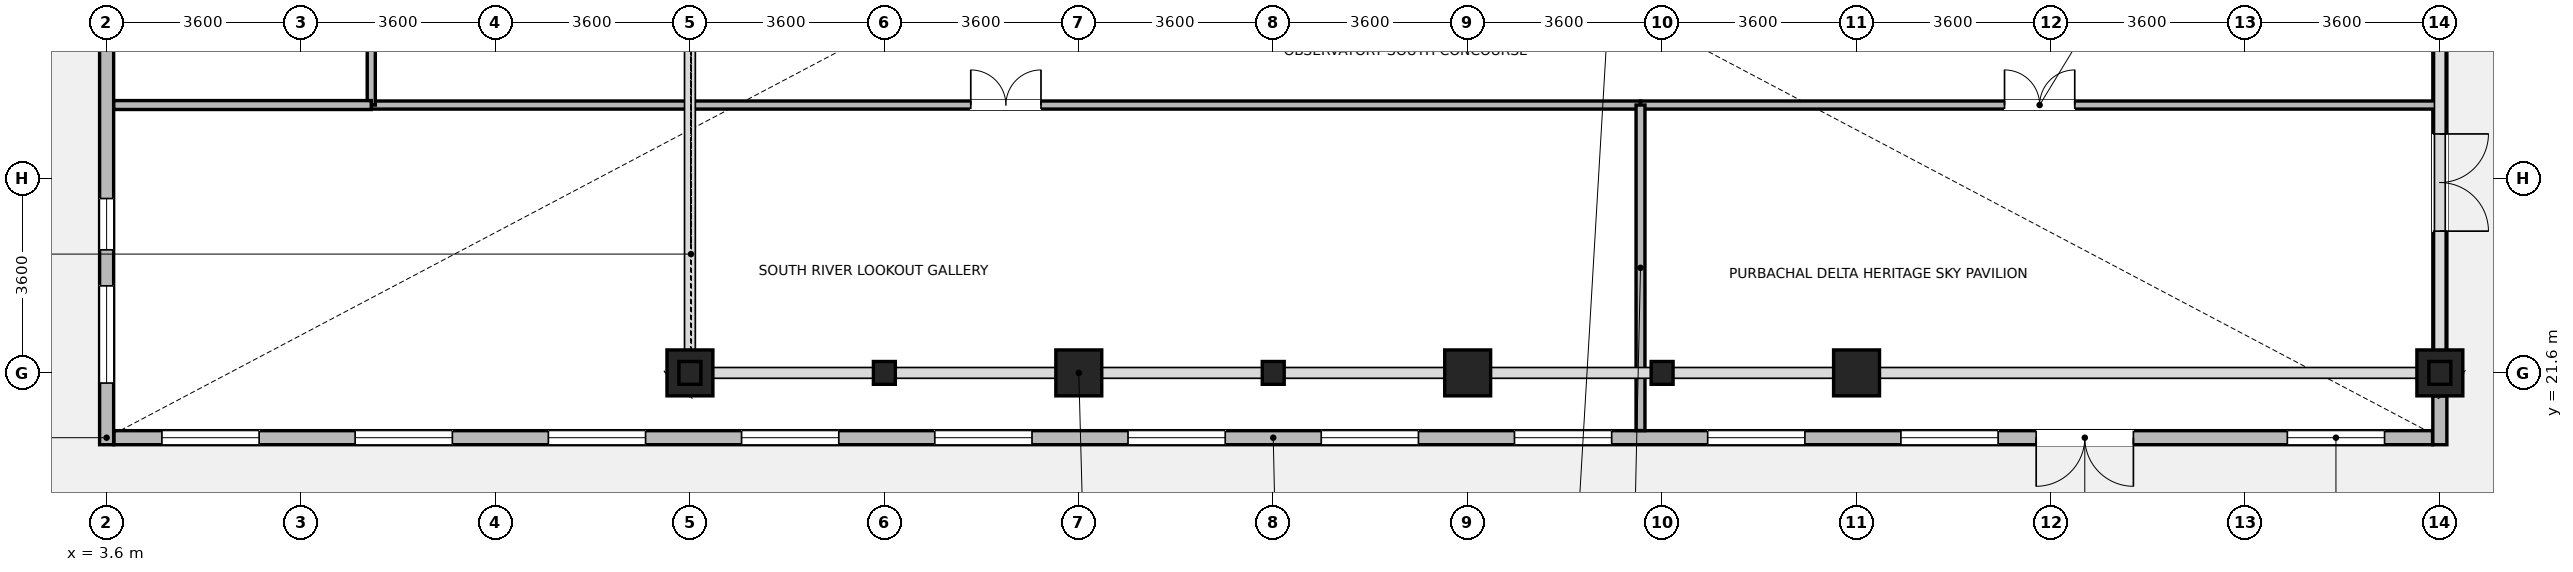
"""IFC4 building model, lengths in metres.
Left out: names, types, materials, properties, quantities, classifications, styles, units other than length and angle.
Written with IfcOpenShell. Run it as: python <this file> out.ifc"""

import sys

from ifc_helpers import new_model, si_unit, direction, frame, frame_2d, origin, origin_2d, place, context, subcontext, project, spatial, rectangle, i_section, extrude, source, transform, mapped, element, fill, save


model = new_model("IFC4")
c1 = context("Model", 3, precision=1e-05, world=origin(), true_north=direction((0.0, 1.0)))
c2 = subcontext(c1, "Body", "Model", "MODEL_VIEW")
j1 = project(units=[si_unit("LENGTHUNIT", "METRE"), si_unit("PLANEANGLEUNIT", "RADIAN")], contexts=[c1])
p1 = place(None, origin())
s1 = spatial("IfcSite", under=j1, at=p1, CompositionType="ELEMENT")
p2 = place(p1, origin())
s2 = spatial("IfcBuilding", under=s1, at=p2, CompositionType="ELEMENT")
p3 = place(p2, frame((0.0, 0.0, 298.0)))
s3 = spatial("IfcBuildingStorey", under=s2, at=p3, CompositionType="ELEMENT", Elevation=298.0)
m1 = source(origin(), c2, "Body", "SweptSolid", [
    extrude(rectangle(XDim=0.85, YDim=0.85, at=origin_2d()), origin(), (0.0, 0.0, 1.0), 6.0),
])
for number, where, z_axis, x_axis in (
    (1, (14.4, 21.6, 0.0), (0.0, 0.0, 1.0), (1.0, 0.0, 0.0)),
    (2, (21.6, 21.6, 0.0), (0.0, 0.0, 1.0), (1.0, 0.0, 0.0)),
    (3, (28.8, 21.6, 0.0), (0.0, 0.0, 1.0), (1.0, 0.0, 0.0)),
    (4, (36.0, 21.6, 0.0), (0.0, 0.0, 1.0), (1.0, 0.0, 0.0)),
    (5, (46.8, 21.6, 0.0), (0.0, 0.0, 1.0), (1.0, 0.0, 0.0)),
):
    element("IfcColumn", number, at=place(p3, frame(where, z_axis=z_axis, x_axis=x_axis)), inside=s3, PredefinedType="COLUMN", context=c2, shape_type="MappedRepresentation", body=[
        mapped(m1, transform((0.0, 0.0, 0.0), x_axis=(1.0, 0.0, 0.0), y_axis=(0.0, 1.0, 0.0), z_axis=(0.0, 0.0, 1.0), scale=1.0)),
    ])
m2 = source(origin(), c2, "Body", "SweptSolid", [
    extrude(i_section(OverallWidth=0.406, OverallDepth=0.422, WebThickness=0.023, FlangeThickness=0.031, FilletRadius=0.015, at=origin_2d()), origin(), (0.0, 0.0, 1.0), 6.0),
])
for number, where, z_axis, x_axis in (
    (6, (18.0, 21.6, 0.0), (0.0, 0.0, 1.0), (1.0, 0.0, 0.0)),
    (7, (25.2, 21.6, 0.0), (0.0, 0.0, 1.0), (1.0, 0.0, 0.0)),
    (8, (32.4, 21.6, 0.0), (0.0, 0.0, 1.0), (1.0, 0.0, 0.0)),
):
    element("IfcColumn", number, at=place(p3, frame(where, z_axis=z_axis, x_axis=x_axis)), inside=s3, PredefinedType="COLUMN", context=c2, shape_type="MappedRepresentation", body=[
        mapped(m2, transform((0.0, 0.0, 0.0), x_axis=(1.0, 0.0, 0.0), y_axis=(0.0, 1.0, 0.0), z_axis=(0.0, 0.0, 1.0), scale=1.0)),
    ])
m3 = source(origin(), c2, "Body", "SweptSolid", [
    extrude(i_section(OverallWidth=0.406, OverallDepth=0.422, WebThickness=0.023, FlangeThickness=0.031, FilletRadius=0.015, at=origin_2d()), origin(), (0.0, 0.0, 1.0), 15.0),
])
for number, where, z_axis, x_axis in (
    (9, (14.4, 21.6, 6.0), (0.0, 0.0, 1.0), (1.0, 0.0, 0.0)),
    (10, (46.8, 21.6, 6.0), (0.0, 0.0, 1.0), (1.0, 0.0, 0.0)),
):
    element("IfcColumn", number, at=place(p3, frame(where, z_axis=z_axis, x_axis=x_axis)), inside=s3, PredefinedType="COLUMN", context=c2, shape_type="MappedRepresentation", body=[
        mapped(m3, transform((0.0, 0.0, 0.0), x_axis=(1.0, 0.0, 0.0), y_axis=(0.0, 1.0, 0.0), z_axis=(0.0, 0.0, 1.0), scale=1.0)),
    ])
p4 = place(p3, frame((46.665, 20.4, 0.0), z_axis=(0.0, 0.0, 1.0), x_axis=(-1.0, 0.0, 0.0)))
e11 = element("IfcWall", 11, at=p4, inside=s3, PredefinedType="STANDARD", context=c2, shape_type="SweptSolid", body=[
    extrude(rectangle(XDim=42.93, YDim=0.26, at=frame_2d((21.465, 0.0))), origin(), (0.0, 0.0, 1.0), 5.9),
])
p5 = place(p4, frame((5.539, 0.0, 0.0)))
e12 = element("IfcOpeningElement", 12, at=p5, cuts=e11, PredefinedType="OPENING", context=c2, shape_type="SweptSolid", body=[
    extrude(rectangle(XDim=1.8, YDim=2.2, at=frame_2d((0.9, 1.1))), frame((0.0, 0.14, 0.0), z_axis=(0.0, -1.0, 0.0), x_axis=(1.0, 0.0, 0.0)), (0.0, 0.0, 1.0), 0.28),
])
p6 = place(p4, frame((0.889, 0.0, 0.85)))
e13 = element("IfcOpeningElement", 13, at=p6, cuts=e11, PredefinedType="OPENING", context=c2, shape_type="SweptSolid", body=[
    extrude(rectangle(XDim=1.8, YDim=1.85, at=frame_2d((0.9, 0.925))), frame((0.0, 0.14, 0.0), z_axis=(0.0, -1.0, 0.0), x_axis=(1.0, 0.0, 0.0)), (0.0, 0.0, 1.0), 0.28),
])
p7 = place(p4, frame((8.044, 0.0, 0.85)))
e14 = element("IfcOpeningElement", 14, at=p7, cuts=e11, PredefinedType="OPENING", context=c2, shape_type="SweptSolid", body=[
    extrude(rectangle(XDim=1.8, YDim=1.85, at=frame_2d((0.9, 0.925))), frame((0.0, 0.14, 0.0), z_axis=(0.0, -1.0, 0.0), x_axis=(1.0, 0.0, 0.0)), (0.0, 0.0, 1.0), 0.28),
])
p8 = place(p4, frame((11.621, 0.0, 0.85)))
e15 = element("IfcOpeningElement", 15, at=p8, cuts=e11, PredefinedType="OPENING", context=c2, shape_type="SweptSolid", body=[
    extrude(rectangle(XDim=1.8, YDim=1.85, at=frame_2d((0.9, 0.925))), frame((0.0, 0.14, 0.0), z_axis=(0.0, -1.0, 0.0), x_axis=(1.0, 0.0, 0.0)), (0.0, 0.0, 1.0), 0.28),
])
p9 = place(p4, frame((15.199, 0.0, 0.85)))
e16 = element("IfcOpeningElement", 16, at=p9, cuts=e11, PredefinedType="OPENING", context=c2, shape_type="SweptSolid", body=[
    extrude(rectangle(XDim=1.8, YDim=1.85, at=frame_2d((0.9, 0.925))), frame((0.0, 0.14, 0.0), z_axis=(0.0, -1.0, 0.0), x_axis=(1.0, 0.0, 0.0)), (0.0, 0.0, 1.0), 0.28),
])
p10 = place(p4, frame((18.776, 0.0, 0.85)))
e17 = element("IfcOpeningElement", 17, at=p10, cuts=e11, PredefinedType="OPENING", context=c2, shape_type="SweptSolid", body=[
    extrude(rectangle(XDim=1.8, YDim=1.85, at=frame_2d((0.9, 0.925))), frame((0.0, 0.14, 0.0), z_axis=(0.0, -1.0, 0.0), x_axis=(1.0, 0.0, 0.0)), (0.0, 0.0, 1.0), 0.28),
])
p11 = place(p4, frame((22.354, 0.0, 0.85)))
e18 = element("IfcOpeningElement", 18, at=p11, cuts=e11, PredefinedType="OPENING", context=c2, shape_type="SweptSolid", body=[
    extrude(rectangle(XDim=1.8, YDim=1.85, at=frame_2d((0.9, 0.925))), frame((0.0, 0.14, 0.0), z_axis=(0.0, -1.0, 0.0), x_axis=(1.0, 0.0, 0.0)), (0.0, 0.0, 1.0), 0.28),
])
p12 = place(p4, frame((25.931, 0.0, 0.85)))
e19 = element("IfcOpeningElement", 19, at=p12, cuts=e11, PredefinedType="OPENING", context=c2, shape_type="SweptSolid", body=[
    extrude(rectangle(XDim=1.8, YDim=1.85, at=frame_2d((0.9, 0.925))), frame((0.0, 0.14, 0.0), z_axis=(0.0, -1.0, 0.0), x_axis=(1.0, 0.0, 0.0)), (0.0, 0.0, 1.0), 0.28),
])
p13 = place(p4, frame((29.509, 0.0, 0.85)))
e20 = element("IfcOpeningElement", 20, at=p13, cuts=e11, PredefinedType="OPENING", context=c2, shape_type="SweptSolid", body=[
    extrude(rectangle(XDim=1.8, YDim=1.85, at=frame_2d((0.9, 0.925))), frame((0.0, 0.14, 0.0), z_axis=(0.0, -1.0, 0.0), x_axis=(1.0, 0.0, 0.0)), (0.0, 0.0, 1.0), 0.28),
])
p14 = place(p4, frame((33.086, 0.0, 0.85)))
e21 = element("IfcOpeningElement", 21, at=p14, cuts=e11, PredefinedType="OPENING", context=c2, shape_type="SweptSolid", body=[
    extrude(rectangle(XDim=1.8, YDim=1.85, at=frame_2d((0.9, 0.925))), frame((0.0, 0.14, 0.0), z_axis=(0.0, -1.0, 0.0), x_axis=(1.0, 0.0, 0.0)), (0.0, 0.0, 1.0), 0.28),
])
p15 = place(p4, frame((36.664, 0.0, 0.85)))
e22 = element("IfcOpeningElement", 22, at=p15, cuts=e11, PredefinedType="OPENING", context=c2, shape_type="SweptSolid", body=[
    extrude(rectangle(XDim=1.8, YDim=1.85, at=frame_2d((0.9, 0.925))), frame((0.0, 0.14, 0.0), z_axis=(0.0, -1.0, 0.0), x_axis=(1.0, 0.0, 0.0)), (0.0, 0.0, 1.0), 0.28),
])
p16 = place(p4, frame((40.241, 0.0, 0.85)))
e23 = element("IfcOpeningElement", 23, at=p16, cuts=e11, PredefinedType="OPENING", context=c2, shape_type="SweptSolid", body=[
    extrude(rectangle(XDim=1.8, YDim=1.85, at=frame_2d((0.9, 0.925))), frame((0.0, 0.14, 0.0), z_axis=(0.0, -1.0, 0.0), x_axis=(1.0, 0.0, 0.0)), (0.0, 0.0, 1.0), 0.28),
])
p17 = place(p3, frame((46.8, 21.174, 0.0), z_axis=(0.0, 0.0, 1.0), x_axis=(0.0, -1.0, 0.0)))
e24 = element("IfcWall", 24, at=p17, inside=s3, PredefinedType="STANDARD", context=c2, shape_type="SweptSolid", body=[
    extrude(rectangle(XDim=0.904, YDim=0.26, at=frame_2d((0.452, 0.0))), origin(), (0.0, 0.0, 1.0), 5.9),
])
p18 = place(p3, frame((46.8, 28.224, 0.0), z_axis=(0.0, 0.0, 1.0), x_axis=(0.0, -1.0, 0.0)))
e25 = element("IfcWall", 25, at=p18, inside=s3, PredefinedType="STANDARD", context=c2, shape_type="SweptSolid", body=[
    extrude(rectangle(XDim=6.198, YDim=0.26, at=frame_2d((3.099, 0.0))), origin(), (0.0, 0.0, 1.0), 5.58),
])
p19 = place(p18, frame((2.199, 0.0, 0.0)))
e26 = element("IfcOpeningElement", 26, at=p19, cuts=e25, PredefinedType="OPENING", context=c2, shape_type="SweptSolid", body=[
    extrude(rectangle(XDim=1.8, YDim=2.2, at=frame_2d((0.9, 1.1))), frame((0.0, 0.14, 0.0), z_axis=(0.0, -1.0, 0.0), x_axis=(1.0, 0.0, 0.0)), (0.0, 0.0, 1.0), 0.28),
])
p20 = place(p3, frame((3.6, 20.27, 0.0), z_axis=(0.0, 0.0, 1.0), x_axis=(0.0, 1.0, 0.0)))
e27 = element("IfcWall", 27, at=p20, inside=s3, PredefinedType="STANDARD", context=c2, shape_type="SweptSolid", body=[
    extrude(rectangle(XDim=8.168, YDim=0.26, at=frame_2d((4.084, 0.0))), origin(), (0.0, 0.0, 1.0), 5.9),
])
p21 = place(p20, frame((1.142, 0.0, 0.85)))
e28 = element("IfcOpeningElement", 28, at=p21, cuts=e27, PredefinedType="OPENING", context=c2, shape_type="SweptSolid", body=[
    extrude(rectangle(XDim=1.8, YDim=1.85, at=frame_2d((0.9, 0.925))), frame((0.0, 0.14, 0.0), z_axis=(0.0, -1.0, 0.0), x_axis=(1.0, 0.0, 0.0)), (0.0, 0.0, 1.0), 0.28),
])
p22 = place(p20, frame((3.609, 0.0, 0.85)))
e29 = element("IfcOpeningElement", 29, at=p22, cuts=e27, PredefinedType="OPENING", context=c2, shape_type="SweptSolid", body=[
    extrude(rectangle(XDim=0.95, YDim=1.75, at=frame_2d((0.475, 0.875))), frame((0.0, 0.14, 0.0), z_axis=(0.0, -1.0, 0.0), x_axis=(1.0, 0.0, 0.0)), (0.0, 0.0, 1.0), 0.28),
])
p23 = place(p3, frame((8.5, 26.56, 0.0), z_axis=(0.0, 0.0, 1.0), x_axis=(1.0, 0.0, 0.0)))
e30 = element("IfcWall", 30, at=p23, inside=s3, PredefinedType="PARTITIONING", context=c2, shape_type="SweptSolid", body=[
    extrude(rectangle(XDim=23.5, YDim=0.15, at=frame_2d((11.75, 0.0))), origin(), (0.0, 0.0, 1.0), 5.9),
])
p24 = place(p23, frame((11.1, 0.0, 0.0)))
e31 = element("IfcOpeningElement", 31, at=p24, cuts=e30, PredefinedType="OPENING", context=c2, shape_type="SweptSolid", body=[
    extrude(rectangle(XDim=1.3, YDim=2.12, at=frame_2d((0.65, 1.06))), frame((0.0, 0.085, 0.0), z_axis=(0.0, -1.0, 0.0), x_axis=(1.0, 0.0, 0.0)), (0.0, 0.0, 1.0), 0.17),
])
p25 = place(p3, frame((32.0, 26.56, 0.0), z_axis=(0.0, 0.0, 1.0), x_axis=(1.0, 0.0, 0.0)))
e32 = element("IfcWall", 32, at=p25, inside=s3, PredefinedType="PARTITIONING", context=c2, shape_type="SweptSolid", body=[
    extrude(rectangle(XDim=14.78, YDim=0.15, at=frame_2d((7.39, 0.0))), origin(), (0.0, 0.0, 1.0), 5.9),
])
p26 = place(p25, frame((6.74, 0.0, 0.0)))
e33 = element("IfcOpeningElement", 33, at=p26, cuts=e32, PredefinedType="OPENING", context=c2, shape_type="SweptSolid", body=[
    extrude(rectangle(XDim=1.3, YDim=2.12, at=frame_2d((0.65, 1.06))), frame((0.0, 0.085, 0.0), z_axis=(0.0, -1.0, 0.0), x_axis=(1.0, 0.0, 0.0)), (0.0, 0.0, 1.0), 0.17),
])
p27 = place(p3, frame((8.5, 26.56, 0.0), z_axis=(0.0, 0.0, 1.0), x_axis=(0.0, 1.0, 0.0)))
e34 = element("IfcWall", 34, at=p27, inside=s3, PredefinedType="PARTITIONING", context=c2, shape_type="SweptSolid", body=[
    extrude(rectangle(XDim=2.0, YDim=0.15, at=frame_2d((1.0, 0.0))), origin(), (0.0, 0.0, 1.0), 5.9),
])
p28 = place(p3, frame((32.0, 20.532, 0.0), z_axis=(0.0, 0.0, 1.0), x_axis=(0.0, 1.0, 0.0)))
e35 = element("IfcWall", 35, at=p28, inside=s3, PredefinedType="PARTITIONING", context=c2, shape_type="SweptSolid", body=[
    extrude(rectangle(XDim=6.028, YDim=0.165, at=frame_2d((3.014, 0.0))), origin(), (0.0, 0.0, 1.0), 5.9),
])
p29 = place(p3, frame((3.732, 26.56, 0.0), z_axis=(0.0, 0.0, 1.0), x_axis=(1.0, 0.0, 0.0)))
e36 = element("IfcWall", 36, at=p29, inside=s3, PredefinedType="PARTITIONING", context=c2, shape_type="SweptSolid", body=[
    extrude(rectangle(XDim=4.768, YDim=0.165, at=frame_2d((2.384, 0.0))), origin(), (0.0, 0.0, 1.0), 5.9),
])
p30 = place(p5, origin())
e37 = element("IfcDoor", 37, at=p30, inside=s3, OperationType="DOUBLE_DOOR_SINGLE_SWING", PredefinedType="DOOR", context=c2, shape_type="SweptSolid", body=[
    extrude(rectangle(XDim=1.8, YDim=2.2, at=frame_2d((0.9, 1.1))), frame((0.0, 0.025, 0.0), z_axis=(0.0, -1.0, 0.0), x_axis=(1.0, 0.0, 0.0)), (0.0, 0.0, 1.0), 0.05),
])
fill(e12, e37)
p31 = place(p6, origin())
e38 = element("IfcWindow", 38, at=p31, inside=s3, PartitioningType="SINGLE_PANEL", PredefinedType="WINDOW", context=c2, shape_type="SweptSolid", body=[
    extrude(rectangle(XDim=1.8, YDim=1.85, at=frame_2d((0.9, 0.925))), frame((0.0, 0.03, 0.0), z_axis=(0.0, -1.0, 0.0), x_axis=(1.0, 0.0, 0.0)), (0.0, 0.0, 1.0), 0.06),
])
fill(e13, e38)
p32 = place(p7, origin())
e39 = element("IfcWindow", 39, at=p32, inside=s3, PartitioningType="SINGLE_PANEL", PredefinedType="WINDOW", context=c2, shape_type="SweptSolid", body=[
    extrude(rectangle(XDim=1.8, YDim=1.85, at=frame_2d((0.9, 0.925))), frame((0.0, 0.03, 0.0), z_axis=(0.0, -1.0, 0.0), x_axis=(1.0, 0.0, 0.0)), (0.0, 0.0, 1.0), 0.06),
])
fill(e14, e39)
p33 = place(p8, origin())
e40 = element("IfcWindow", 40, at=p33, inside=s3, PartitioningType="SINGLE_PANEL", PredefinedType="WINDOW", context=c2, shape_type="SweptSolid", body=[
    extrude(rectangle(XDim=1.8, YDim=1.85, at=frame_2d((0.9, 0.925))), frame((0.0, 0.03, 0.0), z_axis=(0.0, -1.0, 0.0), x_axis=(1.0, 0.0, 0.0)), (0.0, 0.0, 1.0), 0.06),
])
fill(e15, e40)
p34 = place(p9, origin())
e41 = element("IfcWindow", 41, at=p34, inside=s3, PartitioningType="SINGLE_PANEL", PredefinedType="WINDOW", context=c2, shape_type="SweptSolid", body=[
    extrude(rectangle(XDim=1.8, YDim=1.85, at=frame_2d((0.9, 0.925))), frame((0.0, 0.03, 0.0), z_axis=(0.0, -1.0, 0.0), x_axis=(1.0, 0.0, 0.0)), (0.0, 0.0, 1.0), 0.06),
])
fill(e16, e41)
p35 = place(p10, origin())
e42 = element("IfcWindow", 42, at=p35, inside=s3, PartitioningType="SINGLE_PANEL", PredefinedType="WINDOW", context=c2, shape_type="SweptSolid", body=[
    extrude(rectangle(XDim=1.8, YDim=1.85, at=frame_2d((0.9, 0.925))), frame((0.0, 0.03, 0.0), z_axis=(0.0, -1.0, 0.0), x_axis=(1.0, 0.0, 0.0)), (0.0, 0.0, 1.0), 0.06),
])
fill(e17, e42)
p36 = place(p11, origin())
e43 = element("IfcWindow", 43, at=p36, inside=s3, PartitioningType="SINGLE_PANEL", PredefinedType="WINDOW", context=c2, shape_type="SweptSolid", body=[
    extrude(rectangle(XDim=1.8, YDim=1.85, at=frame_2d((0.9, 0.925))), frame((0.0, 0.03, 0.0), z_axis=(0.0, -1.0, 0.0), x_axis=(1.0, 0.0, 0.0)), (0.0, 0.0, 1.0), 0.06),
])
fill(e18, e43)
p37 = place(p12, origin())
e44 = element("IfcWindow", 44, at=p37, inside=s3, PartitioningType="SINGLE_PANEL", PredefinedType="WINDOW", context=c2, shape_type="SweptSolid", body=[
    extrude(rectangle(XDim=1.8, YDim=1.85, at=frame_2d((0.9, 0.925))), frame((0.0, 0.03, 0.0), z_axis=(0.0, -1.0, 0.0), x_axis=(1.0, 0.0, 0.0)), (0.0, 0.0, 1.0), 0.06),
])
fill(e19, e44)
p38 = place(p13, origin())
e45 = element("IfcWindow", 45, at=p38, inside=s3, PartitioningType="SINGLE_PANEL", PredefinedType="WINDOW", context=c2, shape_type="SweptSolid", body=[
    extrude(rectangle(XDim=1.8, YDim=1.85, at=frame_2d((0.9, 0.925))), frame((0.0, 0.03, 0.0), z_axis=(0.0, -1.0, 0.0), x_axis=(1.0, 0.0, 0.0)), (0.0, 0.0, 1.0), 0.06),
])
fill(e20, e45)
p39 = place(p14, origin())
e46 = element("IfcWindow", 46, at=p39, inside=s3, PartitioningType="SINGLE_PANEL", PredefinedType="WINDOW", context=c2, shape_type="SweptSolid", body=[
    extrude(rectangle(XDim=1.8, YDim=1.85, at=frame_2d((0.9, 0.925))), frame((0.0, 0.03, 0.0), z_axis=(0.0, -1.0, 0.0), x_axis=(1.0, 0.0, 0.0)), (0.0, 0.0, 1.0), 0.06),
])
fill(e21, e46)
p40 = place(p15, origin())
e47 = element("IfcWindow", 47, at=p40, inside=s3, PartitioningType="SINGLE_PANEL", PredefinedType="WINDOW", context=c2, shape_type="SweptSolid", body=[
    extrude(rectangle(XDim=1.8, YDim=1.85, at=frame_2d((0.9, 0.925))), frame((0.0, 0.03, 0.0), z_axis=(0.0, -1.0, 0.0), x_axis=(1.0, 0.0, 0.0)), (0.0, 0.0, 1.0), 0.06),
])
fill(e22, e47)
p41 = place(p16, origin())
e48 = element("IfcWindow", 48, at=p41, inside=s3, PartitioningType="SINGLE_PANEL", PredefinedType="WINDOW", context=c2, shape_type="SweptSolid", body=[
    extrude(rectangle(XDim=1.8, YDim=1.85, at=frame_2d((0.9, 0.925))), frame((0.0, 0.03, 0.0), z_axis=(0.0, -1.0, 0.0), x_axis=(1.0, 0.0, 0.0)), (0.0, 0.0, 1.0), 0.06),
])
fill(e23, e48)
p42 = place(p19, origin())
e49 = element("IfcDoor", 49, at=p42, inside=s3, OperationType="DOUBLE_DOOR_SINGLE_SWING", PredefinedType="DOOR", context=c2, shape_type="SweptSolid", body=[
    extrude(rectangle(XDim=1.8, YDim=2.2, at=frame_2d((0.9, 1.1))), frame((0.0, 0.025, 0.0), z_axis=(0.0, -1.0, 0.0), x_axis=(1.0, 0.0, 0.0)), (0.0, 0.0, 1.0), 0.05),
])
fill(e26, e49)
p43 = place(p21, origin())
e50 = element("IfcWindow", 50, at=p43, inside=s3, PartitioningType="SINGLE_PANEL", PredefinedType="WINDOW", context=c2, shape_type="SweptSolid", body=[
    extrude(rectangle(XDim=1.8, YDim=1.85, at=frame_2d((0.9, 0.925))), frame((0.0, 0.03, 0.0), z_axis=(0.0, -1.0, 0.0), x_axis=(1.0, 0.0, 0.0)), (0.0, 0.0, 1.0), 0.06),
])
fill(e28, e50)
p44 = place(p22, origin())
e51 = element("IfcWindow", 51, at=p44, inside=s3, PartitioningType="SINGLE_PANEL", PredefinedType="WINDOW", context=c2, shape_type="SweptSolid", body=[
    extrude(rectangle(XDim=0.95, YDim=1.75, at=frame_2d((0.475, 0.875))), frame((0.0, 0.03, 0.0), z_axis=(0.0, -1.0, 0.0), x_axis=(1.0, 0.0, 0.0)), (0.0, 0.0, 1.0), 0.06),
])
fill(e29, e51)
p45 = place(p24, origin())
e52 = element("IfcDoor", 52, at=p45, inside=s3, OperationType="DOUBLE_DOOR_SINGLE_SWING", PredefinedType="DOOR", context=c2, shape_type="SweptSolid", body=[
    extrude(rectangle(XDim=1.3, YDim=2.12, at=frame_2d((0.65, 1.06))), frame((0.0, 0.025, 0.0), z_axis=(0.0, -1.0, 0.0), x_axis=(1.0, 0.0, 0.0)), (0.0, 0.0, 1.0), 0.05),
])
fill(e31, e52)
p46 = place(p26, origin())
e53 = element("IfcDoor", 53, at=p46, inside=s3, OperationType="DOUBLE_DOOR_SINGLE_SWING", PredefinedType="DOOR", context=c2, shape_type="SweptSolid", body=[
    extrude(rectangle(XDim=1.3, YDim=2.12, at=frame_2d((0.65, 1.06))), frame((0.0, 0.025, 0.0), z_axis=(0.0, -1.0, 0.0), x_axis=(1.0, 0.0, 0.0)), (0.0, 0.0, 1.0), 0.05),
])
fill(e33, e53)
save(model, sys.argv[1])
